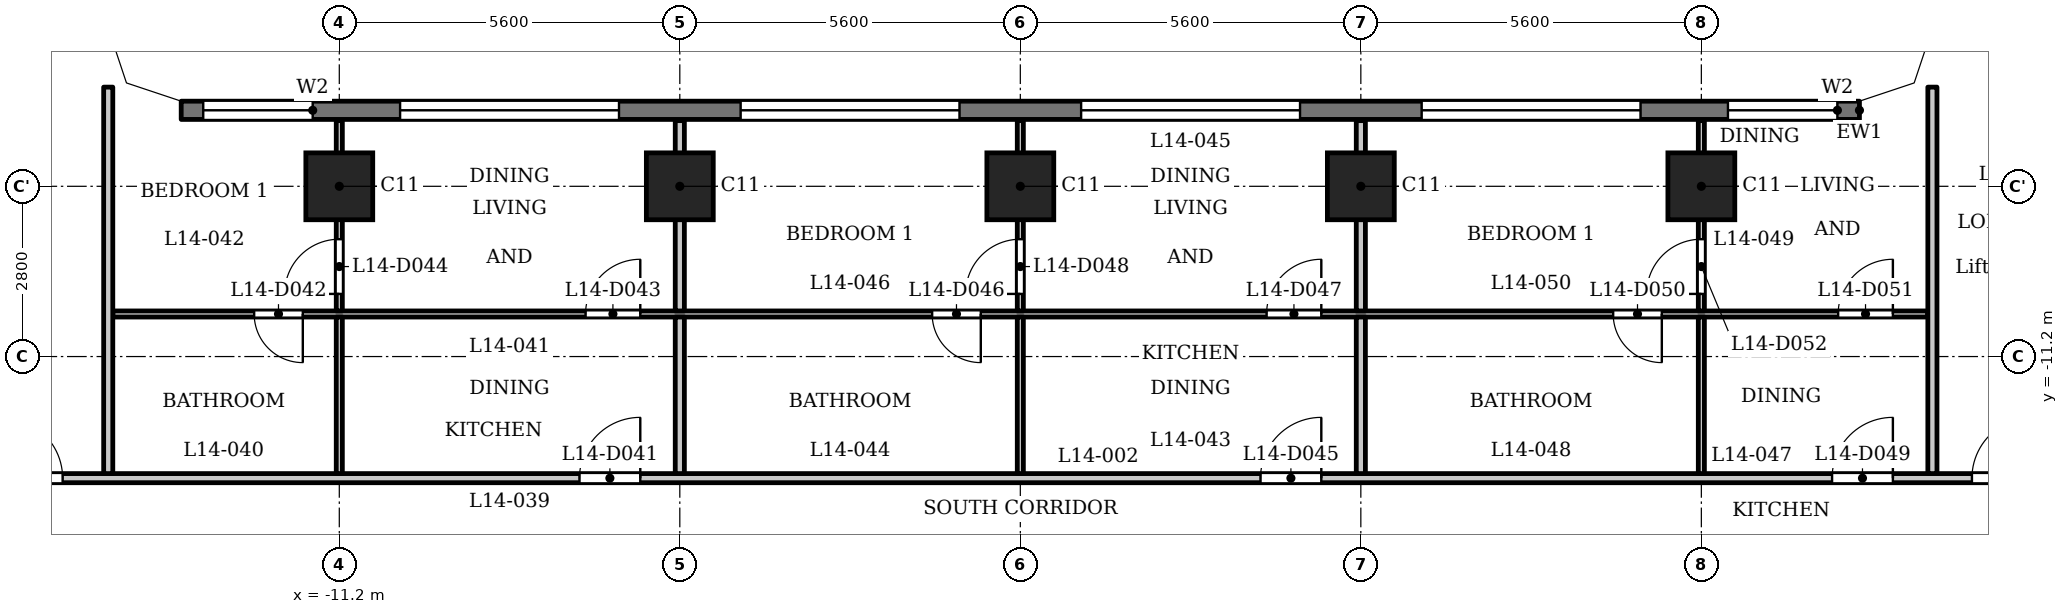
"""IFC4 building model, lengths in metres.
Left out: names, types, materials, properties, quantities, classifications, styles, units other than length and angle.
Written with IfcOpenShell. Run it as: python <this file> out.ifc"""

import sys

from ifc_helpers import new_model, si_unit, direction, frame, frame_2d, origin, origin_2d, place, context, subcontext, project, spatial, polyline, rectangle, outline, extrude, element, fill, save


model = new_model("IFC4")
c1 = context("Model", 3, precision=1e-05, world=origin(), true_north=direction((0.0, 1.0)))
c2 = subcontext(c1, "Body", "Model", "MODEL_VIEW")
j1 = project(units=[si_unit("LENGTHUNIT", "METRE"), si_unit("PLANEANGLEUNIT", "RADIAN")], contexts=[c1])
p1 = place(None, origin())
s1 = spatial("IfcSite", under=j1, at=p1, CompositionType="ELEMENT")
p2 = place(p1, origin())
s2 = spatial("IfcBuilding", under=s1, at=p2, CompositionType="ELEMENT")
p3 = place(p2, frame((0.0, 0.0, 58.5)))
s3 = spatial("IfcBuildingStorey", under=s2, at=p3, CompositionType="ELEMENT", Elevation=58.5)
for number, where, z_axis, x_axis in (
    (1, (-11.2, -8.4, 0.0), (0.0, 0.0, 1.0), (1.0, 0.0, 0.0)),
    (2, (-5.6, -8.4, 0.0), (0.0, 0.0, 1.0), (1.0, 0.0, 0.0)),
    (3, (0.0, -8.4, 0.0), (0.0, 0.0, 1.0), (1.0, 0.0, 0.0)),
    (4, (5.6, -8.4, 0.0), (0.0, 0.0, 1.0), (1.0, 0.0, 0.0)),
    (5, (11.2, -8.4, 0.0), (0.0, 0.0, 1.0), (1.0, 0.0, 0.0)),
):
    element("IfcColumn", number, at=place(p3, frame(where, z_axis=z_axis, x_axis=x_axis)), inside=s3, PredefinedType="COLUMN", context=c2, shape_type="SweptSolid", body=[
        extrude(rectangle(XDim=1.1, YDim=1.1, at=origin_2d()), origin(), (0.0, 0.0, 1.0), 3.5),
    ])
p4 = place(p3, frame((13.8, -7.15, 0.0), z_axis=(0.0, 0.0, 1.0), x_axis=(-1.0, 0.0, 0.0)))
e6 = element("IfcWall", 6, at=p4, inside=s3, PredefinedType="SOLIDWALL", context=c2, shape_type="SweptSolid", body=[
    extrude(rectangle(XDim=27.6, YDim=0.3, at=frame_2d((13.8, 0.0))), origin(), (0.0, 0.0, 1.0), 3.2),
])
p5 = place(p4, frame((0.363, 0.0, 0.9)))
e7 = element("IfcOpeningElement", 7, at=p5, cuts=e6, PredefinedType="OPENING", context=c2, shape_type="SweptSolid", body=[
    extrude(rectangle(XDim=1.8, YDim=1.25, at=frame_2d((0.9, 0.625))), frame((0.0, 0.16, 0.0), z_axis=(0.0, -1.0, 0.0), x_axis=(1.0, 0.0, 0.0)), (0.0, 0.0, 1.0), 0.32),
])
p6 = place(p4, frame((3.6, 0.0, 1.2)))
e8 = element("IfcOpeningElement", 8, at=p6, cuts=e6, PredefinedType="OPENING", context=c2, shape_type="SweptSolid", body=[
    extrude(rectangle(XDim=3.6, YDim=0.95, at=frame_2d((1.8, 0.475))), frame((0.0, 0.16, 0.0), z_axis=(0.0, -1.0, 0.0), x_axis=(1.0, 0.0, 0.0)), (0.0, 0.0, 1.0), 0.32),
])
p7 = place(p4, frame((9.2, 0.0, 1.2)))
e9 = element("IfcOpeningElement", 9, at=p7, cuts=e6, PredefinedType="OPENING", context=c2, shape_type="SweptSolid", body=[
    extrude(rectangle(XDim=3.6, YDim=0.95, at=frame_2d((1.8, 0.475))), frame((0.0, 0.16, 0.0), z_axis=(0.0, -1.0, 0.0), x_axis=(1.0, 0.0, 0.0)), (0.0, 0.0, 1.0), 0.32),
])
p8 = place(p4, frame((14.8, 0.0, 1.2)))
e10 = element("IfcOpeningElement", 10, at=p8, cuts=e6, PredefinedType="OPENING", context=c2, shape_type="SweptSolid", body=[
    extrude(rectangle(XDim=3.6, YDim=0.95, at=frame_2d((1.8, 0.475))), frame((0.0, 0.16, 0.0), z_axis=(0.0, -1.0, 0.0), x_axis=(1.0, 0.0, 0.0)), (0.0, 0.0, 1.0), 0.32),
])
p9 = place(p4, frame((20.4, 0.0, 1.2)))
e11 = element("IfcOpeningElement", 11, at=p9, cuts=e6, PredefinedType="OPENING", context=c2, shape_type="SweptSolid", body=[
    extrude(rectangle(XDim=3.6, YDim=0.95, at=frame_2d((1.8, 0.475))), frame((0.0, 0.16, 0.0), z_axis=(0.0, -1.0, 0.0), x_axis=(1.0, 0.0, 0.0)), (0.0, 0.0, 1.0), 0.32),
])
p10 = place(p4, frame((25.438, 0.0, 0.9)))
e12 = element("IfcOpeningElement", 12, at=p10, cuts=e6, PredefinedType="OPENING", context=c2, shape_type="SweptSolid", body=[
    extrude(rectangle(XDim=1.8, YDim=1.25, at=frame_2d((0.9, 0.625))), frame((0.0, 0.16, 0.0), z_axis=(0.0, -1.0, 0.0), x_axis=(1.0, 0.0, 0.0)), (0.0, 0.0, 1.0), 0.32),
])
p11 = place(p3, frame((-17.4, -13.2, 0.0), z_axis=(0.0, 0.0, 1.0), x_axis=(1.0, 0.0, 0.0)))
e13 = element("IfcWall", 13, at=p11, inside=s3, PredefinedType="PARTITIONING", context=c2, shape_type="SweptSolid", body=[
    extrude(rectangle(XDim=34.8, YDim=0.15, at=frame_2d((17.4, 0.0))), origin(), (0.0, 0.0, 1.0), 3.2),
])
p12 = place(p11, frame((0.65, 0.0, 0.0)))
e14 = element("IfcOpeningElement", 14, at=p12, cuts=e13, PredefinedType="OPENING", context=c2, shape_type="SweptSolid", body=[
    extrude(rectangle(XDim=1.0, YDim=2.1, at=frame_2d((0.5, 1.05))), frame((0.0, 0.085, 0.0), z_axis=(0.0, -1.0, 0.0), x_axis=(1.0, 0.0, 0.0)), (0.0, 0.0, 1.0), 0.17),
])
p13 = place(p11, frame((33.05, 0.0, 0.0)))
e15 = element("IfcOpeningElement", 15, at=p13, cuts=e13, PredefinedType="OPENING", context=c2, shape_type="SweptSolid", body=[
    extrude(rectangle(XDim=1.0, YDim=2.1, at=frame_2d((0.5, 1.05))), frame((0.0, 0.085, 0.0), z_axis=(0.0, -1.0, 0.0), x_axis=(1.0, 0.0, 0.0)), (0.0, 0.0, 1.0), 0.17),
])
p14 = place(p11, frame((10.15, 0.0, 0.0)))
e16 = element("IfcOpeningElement", 16, at=p14, cuts=e13, PredefinedType="OPENING", context=c2, shape_type="SweptSolid", body=[
    extrude(rectangle(XDim=1.0, YDim=2.1, at=frame_2d((0.5, 1.05))), frame((0.0, 0.085, 0.0), z_axis=(0.0, -1.0, 0.0), x_axis=(1.0, 0.0, 0.0)), (0.0, 0.0, 1.0), 0.17),
])
p15 = place(p11, frame((21.35, 0.0, 0.0)))
e17 = element("IfcOpeningElement", 17, at=p15, cuts=e13, PredefinedType="OPENING", context=c2, shape_type="SweptSolid", body=[
    extrude(rectangle(XDim=1.0, YDim=2.1, at=frame_2d((0.5, 1.05))), frame((0.0, 0.085, 0.0), z_axis=(0.0, -1.0, 0.0), x_axis=(1.0, 0.0, 0.0)), (0.0, 0.0, 1.0), 0.17),
])
p16 = place(p11, frame((30.75, 0.0, 0.0)))
e18 = element("IfcOpeningElement", 18, at=p16, cuts=e13, PredefinedType="OPENING", context=c2, shape_type="SweptSolid", body=[
    extrude(rectangle(XDim=1.0, YDim=2.1, at=frame_2d((0.5, 1.05))), frame((0.0, 0.085, 0.0), z_axis=(0.0, -1.0, 0.0), x_axis=(1.0, 0.0, 0.0)), (0.0, 0.0, 1.0), 0.17),
])
p17 = place(p3, frame((-14.925, -10.5, 0.0), z_axis=(0.0, 0.0, 1.0), x_axis=(1.0, 0.0, 0.0)))
e19 = element("IfcWall", 19, at=p17, inside=s3, PredefinedType="PARTITIONING", context=c2, shape_type="SweptSolid", body=[
    extrude(rectangle(XDim=29.85, YDim=0.1, at=frame_2d((14.925, 0.0))), origin(), (0.0, 0.0, 1.0), 3.2),
])
p18 = place(p17, frame((2.325, 0.0, 0.0)))
e20 = element("IfcOpeningElement", 20, at=p18, cuts=e19, PredefinedType="OPENING", context=c2, shape_type="SweptSolid", body=[
    extrude(rectangle(XDim=0.8, YDim=2.1, at=frame_2d((0.4, 1.05))), frame((0.0, 0.06, 0.0), z_axis=(0.0, -1.0, 0.0), x_axis=(1.0, 0.0, 0.0)), (0.0, 0.0, 1.0), 0.12),
])
p19 = place(p17, frame((7.775, 0.0, 0.0)))
e21 = element("IfcOpeningElement", 21, at=p19, cuts=e19, PredefinedType="OPENING", context=c2, shape_type="SweptSolid", body=[
    extrude(rectangle(XDim=0.9, YDim=2.1, at=frame_2d((0.45, 1.05))), frame((0.0, 0.06, 0.0), z_axis=(0.0, -1.0, 0.0), x_axis=(1.0, 0.0, 0.0)), (0.0, 0.0, 1.0), 0.12),
])
p20 = place(p17, frame((13.475, 0.0, 0.0)))
e22 = element("IfcOpeningElement", 22, at=p20, cuts=e19, PredefinedType="OPENING", context=c2, shape_type="SweptSolid", body=[
    extrude(rectangle(XDim=0.8, YDim=2.1, at=frame_2d((0.4, 1.05))), frame((0.0, 0.06, 0.0), z_axis=(0.0, -1.0, 0.0), x_axis=(1.0, 0.0, 0.0)), (0.0, 0.0, 1.0), 0.12),
])
p21 = place(p17, frame((18.975, 0.0, 0.0)))
e23 = element("IfcOpeningElement", 23, at=p21, cuts=e19, PredefinedType="OPENING", context=c2, shape_type="SweptSolid", body=[
    extrude(rectangle(XDim=0.9, YDim=2.1, at=frame_2d((0.45, 1.05))), frame((0.0, 0.06, 0.0), z_axis=(0.0, -1.0, 0.0), x_axis=(1.0, 0.0, 0.0)), (0.0, 0.0, 1.0), 0.12),
])
p22 = place(p17, frame((24.675, 0.0, 0.0)))
e24 = element("IfcOpeningElement", 24, at=p22, cuts=e19, PredefinedType="OPENING", context=c2, shape_type="SweptSolid", body=[
    extrude(rectangle(XDim=0.8, YDim=2.1, at=frame_2d((0.4, 1.05))), frame((0.0, 0.06, 0.0), z_axis=(0.0, -1.0, 0.0), x_axis=(1.0, 0.0, 0.0)), (0.0, 0.0, 1.0), 0.12),
])
p23 = place(p17, frame((28.375, 0.0, 0.0)))
e25 = element("IfcOpeningElement", 25, at=p23, cuts=e19, PredefinedType="OPENING", context=c2, shape_type="SweptSolid", body=[
    extrude(rectangle(XDim=0.9, YDim=2.1, at=frame_2d((0.45, 1.05))), frame((0.0, 0.06, 0.0), z_axis=(0.0, -1.0, 0.0), x_axis=(1.0, 0.0, 0.0)), (0.0, 0.0, 1.0), 0.12),
])
p24 = place(p3, frame((-15.0, -13.125, 0.0), z_axis=(0.0, 0.0, 1.0), x_axis=(0.0, 1.0, 0.0)))
e26 = element("IfcWall", 26, at=p24, inside=s3, PredefinedType="PARTITIONING", context=c2, shape_type="SweptSolid", body=[
    extrude(rectangle(XDim=6.356, YDim=0.15, at=frame_2d((3.178, 0.0))), origin(), (0.0, 0.0, 1.0), 3.2),
])
p25 = place(p3, frame((-11.2, -13.125, 0.0), z_axis=(0.0, 0.0, 1.0), x_axis=(0.0, 1.0, 0.0)))
e27 = element("IfcWall", 27, at=p25, inside=s3, PredefinedType="PARTITIONING", context=c2, shape_type="SweptSolid", body=[
    extrude(rectangle(XDim=2.575, YDim=0.1, at=frame_2d((1.288, 0.0))), origin(), (0.0, 0.0, 1.0), 3.2),
])
p26 = place(p3, frame((-11.2, -10.45, 0.0), z_axis=(0.0, 0.0, 1.0), x_axis=(0.0, 1.0, 0.0)))
e28 = element("IfcWall", 28, at=p26, inside=s3, PredefinedType="PARTITIONING", context=c2, shape_type="SweptSolid", body=[
    extrude(rectangle(XDim=3.13, YDim=0.1, at=frame_2d((1.565, 0.0))), origin(), (0.0, 0.0, 1.0), 3.2),
])
p27 = place(p26, frame((0.28, 0.0, 0.0)))
e29 = element("IfcOpeningElement", 29, at=p27, cuts=e28, PredefinedType="OPENING", context=c2, shape_type="SweptSolid", body=[
    extrude(rectangle(XDim=0.9, YDim=2.1, at=frame_2d((0.45, 1.05))), frame((0.0, 0.06, 0.0), z_axis=(0.0, -1.0, 0.0), x_axis=(1.0, 0.0, 0.0)), (0.0, 0.0, 1.0), 0.12),
])
p28 = place(p3, frame((-5.6, -13.125, 0.0), z_axis=(0.0, 0.0, 1.0), x_axis=(0.0, 1.0, 0.0)))
e30 = element("IfcWall", 30, at=p28, inside=s3, PredefinedType="PARTITIONING", context=c2, shape_type="SweptSolid", body=[
    extrude(rectangle(XDim=2.575, YDim=0.15, at=frame_2d((1.288, 0.0))), origin(), (0.0, 0.0, 1.0), 3.2),
])
p29 = place(p3, frame((-5.6, -10.45, 0.0), z_axis=(0.0, 0.0, 1.0), x_axis=(0.0, 1.0, 0.0)))
e31 = element("IfcWall", 31, at=p29, inside=s3, PredefinedType="PARTITIONING", context=c2, shape_type="SweptSolid", body=[
    extrude(rectangle(XDim=3.13, YDim=0.15, at=frame_2d((1.565, 0.0))), origin(), (0.0, 0.0, 1.0), 3.2),
])
p30 = place(p3, frame((0.0, -13.125, 0.0), z_axis=(0.0, 0.0, 1.0), x_axis=(0.0, 1.0, 0.0)))
e32 = element("IfcWall", 32, at=p30, inside=s3, PredefinedType="PARTITIONING", context=c2, shape_type="SweptSolid", body=[
    extrude(rectangle(XDim=2.575, YDim=0.1, at=frame_2d((1.288, 0.0))), origin(), (0.0, 0.0, 1.0), 3.2),
])
p31 = place(p3, frame((0.0, -10.45, 0.0), z_axis=(0.0, 0.0, 1.0), x_axis=(0.0, 1.0, 0.0)))
e33 = element("IfcWall", 33, at=p31, inside=s3, PredefinedType="PARTITIONING", context=c2, shape_type="SweptSolid", body=[
    extrude(rectangle(XDim=3.13, YDim=0.1, at=frame_2d((1.565, 0.0))), origin(), (0.0, 0.0, 1.0), 3.2),
])
p32 = place(p31, frame((0.28, 0.0, 0.0)))
e34 = element("IfcOpeningElement", 34, at=p32, cuts=e33, PredefinedType="OPENING", context=c2, shape_type="SweptSolid", body=[
    extrude(rectangle(XDim=0.9, YDim=2.1, at=frame_2d((0.45, 1.05))), frame((0.0, 0.06, 0.0), z_axis=(0.0, -1.0, 0.0), x_axis=(1.0, 0.0, 0.0)), (0.0, 0.0, 1.0), 0.12),
])
p33 = place(p3, frame((5.6, -13.125, 0.0), z_axis=(0.0, 0.0, 1.0), x_axis=(0.0, 1.0, 0.0)))
e35 = element("IfcWall", 35, at=p33, inside=s3, PredefinedType="PARTITIONING", context=c2, shape_type="SweptSolid", body=[
    extrude(rectangle(XDim=2.575, YDim=0.15, at=frame_2d((1.288, 0.0))), origin(), (0.0, 0.0, 1.0), 3.2),
])
p34 = place(p3, frame((5.6, -10.45, 0.0), z_axis=(0.0, 0.0, 1.0), x_axis=(0.0, 1.0, 0.0)))
e36 = element("IfcWall", 36, at=p34, inside=s3, PredefinedType="PARTITIONING", context=c2, shape_type="SweptSolid", body=[
    extrude(rectangle(XDim=3.13, YDim=0.15, at=frame_2d((1.565, 0.0))), origin(), (0.0, 0.0, 1.0), 3.2),
])
p35 = place(p3, frame((11.2, -13.125, 0.0), z_axis=(0.0, 0.0, 1.0), x_axis=(0.0, 1.0, 0.0)))
e37 = element("IfcWall", 37, at=p35, inside=s3, PredefinedType="PARTITIONING", context=c2, shape_type="SweptSolid", body=[
    extrude(rectangle(XDim=2.575, YDim=0.1, at=frame_2d((1.288, 0.0))), origin(), (0.0, 0.0, 1.0), 3.2),
])
p36 = place(p3, frame((11.2, -10.45, 0.0), z_axis=(0.0, 0.0, 1.0), x_axis=(0.0, 1.0, 0.0)))
e38 = element("IfcWall", 38, at=p36, inside=s3, PredefinedType="PARTITIONING", context=c2, shape_type="SweptSolid", body=[
    extrude(rectangle(XDim=3.13, YDim=0.1, at=frame_2d((1.565, 0.0))), origin(), (0.0, 0.0, 1.0), 3.2),
])
p37 = place(p36, frame((0.28, 0.0, 0.0)))
e39 = element("IfcOpeningElement", 39, at=p37, cuts=e38, PredefinedType="OPENING", context=c2, shape_type="SweptSolid", body=[
    extrude(rectangle(XDim=0.9, YDim=2.1, at=frame_2d((0.45, 1.05))), frame((0.0, 0.06, 0.0), z_axis=(0.0, -1.0, 0.0), x_axis=(1.0, 0.0, 0.0)), (0.0, 0.0, 1.0), 0.12),
])
p38 = place(p3, frame((15.0, -13.125, 0.0), z_axis=(0.0, 0.0, 1.0), x_axis=(0.0, 1.0, 0.0)))
e40 = element("IfcWall", 40, at=p38, inside=s3, PredefinedType="PARTITIONING", context=c2, shape_type="SweptSolid", body=[
    extrude(rectangle(XDim=6.356, YDim=0.15, at=frame_2d((3.178, 0.0))), origin(), (0.0, 0.0, 1.0), 3.2),
])
p39 = place(p3, origin())
e41 = element("IfcWall", 41, at=p39, inside=s3, PredefinedType="SOLIDWALL", context=c2, shape_type="SweptSolid", body=[
    extrude(outline(polyline([(14.937, -6.937), (15.3, -5.849), (15.3, -5.8), (15.0, -5.8), (14.7, -6.7), (13.8, -7.0), (13.8, -7.3), (13.849, -7.3), (14.937, -6.937)])), origin(), (0.0, 0.0, 1.0), 3.2),
])
e42 = element("IfcWall", 42, at=p39, inside=s3, PredefinedType="SOLIDWALL", context=c2, shape_type="SweptSolid", body=[
    extrude(outline(polyline([(-14.937, -6.937), (-13.849, -7.3), (-13.8, -7.3), (-13.8, -7.0), (-14.7, -6.7), (-15.0, -5.8), (-15.3, -5.8), (-15.3, -5.849), (-14.937, -6.937)])), origin(), (0.0, 0.0, 1.0), 3.2),
])
p40 = place(p12, origin())
e43 = element("IfcDoor", 43, at=p40, inside=s3, OperationType="SINGLE_SWING_RIGHT", PredefinedType="DOOR", context=c2, shape_type="SweptSolid", body=[
    extrude(rectangle(XDim=1.0, YDim=2.1, at=frame_2d((0.5, 1.05))), frame((0.0, 0.025, 0.0), z_axis=(0.0, -1.0, 0.0), x_axis=(1.0, 0.0, 0.0)), (0.0, 0.0, 1.0), 0.05),
])
fill(e14, e43)
p41 = place(p13, origin())
e44 = element("IfcDoor", 44, at=p41, inside=s3, OperationType="SINGLE_SWING_LEFT", PredefinedType="DOOR", context=c2, shape_type="SweptSolid", body=[
    extrude(rectangle(XDim=1.0, YDim=2.1, at=frame_2d((0.5, 1.05))), frame((0.0, 0.025, 0.0), z_axis=(0.0, -1.0, 0.0), x_axis=(1.0, 0.0, 0.0)), (0.0, 0.0, 1.0), 0.05),
])
fill(e15, e44)
p42 = place(p14, origin())
e45 = element("IfcDoor", 45, at=p42, inside=s3, OperationType="SINGLE_SWING_LEFT", PredefinedType="DOOR", context=c2, shape_type="SweptSolid", body=[
    extrude(rectangle(XDim=1.0, YDim=2.1, at=frame_2d((0.5, 1.05))), frame((0.0, 0.025, 0.0), z_axis=(0.0, -1.0, 0.0), x_axis=(1.0, 0.0, 0.0)), (0.0, 0.0, 1.0), 0.05),
])
fill(e16, e45)
p43 = place(p18, origin())
e46 = element("IfcDoor", 46, at=p43, inside=s3, OperationType="SINGLE_SWING_RIGHT", PredefinedType="DOOR", context=c2, shape_type="SweptSolid", body=[
    extrude(rectangle(XDim=0.8, YDim=2.1, at=frame_2d((0.4, 1.05))), frame((0.0, 0.025, 0.0), z_axis=(0.0, -1.0, 0.0), x_axis=(1.0, 0.0, 0.0)), (0.0, 0.0, 1.0), 0.05),
])
fill(e20, e46)
p44 = place(p19, origin())
e47 = element("IfcDoor", 47, at=p44, inside=s3, OperationType="SINGLE_SWING_LEFT", PredefinedType="DOOR", context=c2, shape_type="SweptSolid", body=[
    extrude(rectangle(XDim=0.9, YDim=2.1, at=frame_2d((0.45, 1.05))), frame((0.0, 0.025, 0.0), z_axis=(0.0, -1.0, 0.0), x_axis=(1.0, 0.0, 0.0)), (0.0, 0.0, 1.0), 0.05),
])
fill(e21, e47)
p45 = place(p27, origin())
e48 = element("IfcDoor", 48, at=p45, inside=s3, OperationType="SINGLE_SWING_RIGHT", PredefinedType="DOOR", context=c2, shape_type="SweptSolid", body=[
    extrude(rectangle(XDim=0.9, YDim=2.1, at=frame_2d((0.45, 1.05))), frame((0.0, 0.025, 0.0), z_axis=(0.0, -1.0, 0.0), x_axis=(1.0, 0.0, 0.0)), (0.0, 0.0, 1.0), 0.05),
])
fill(e29, e48)
p46 = place(p15, origin())
e49 = element("IfcDoor", 49, at=p46, inside=s3, OperationType="SINGLE_SWING_LEFT", PredefinedType="DOOR", context=c2, shape_type="SweptSolid", body=[
    extrude(rectangle(XDim=1.0, YDim=2.1, at=frame_2d((0.5, 1.05))), frame((0.0, 0.025, 0.0), z_axis=(0.0, -1.0, 0.0), x_axis=(1.0, 0.0, 0.0)), (0.0, 0.0, 1.0), 0.05),
])
fill(e17, e49)
p47 = place(p20, origin())
e50 = element("IfcDoor", 50, at=p47, inside=s3, OperationType="SINGLE_SWING_RIGHT", PredefinedType="DOOR", context=c2, shape_type="SweptSolid", body=[
    extrude(rectangle(XDim=0.8, YDim=2.1, at=frame_2d((0.4, 1.05))), frame((0.0, 0.025, 0.0), z_axis=(0.0, -1.0, 0.0), x_axis=(1.0, 0.0, 0.0)), (0.0, 0.0, 1.0), 0.05),
])
fill(e22, e50)
p48 = place(p21, origin())
e51 = element("IfcDoor", 51, at=p48, inside=s3, OperationType="SINGLE_SWING_LEFT", PredefinedType="DOOR", context=c2, shape_type="SweptSolid", body=[
    extrude(rectangle(XDim=0.9, YDim=2.1, at=frame_2d((0.45, 1.05))), frame((0.0, 0.025, 0.0), z_axis=(0.0, -1.0, 0.0), x_axis=(1.0, 0.0, 0.0)), (0.0, 0.0, 1.0), 0.05),
])
fill(e23, e51)
p49 = place(p32, origin())
e52 = element("IfcDoor", 52, at=p49, inside=s3, OperationType="SINGLE_SWING_RIGHT", PredefinedType="DOOR", context=c2, shape_type="SweptSolid", body=[
    extrude(rectangle(XDim=0.9, YDim=2.1, at=frame_2d((0.45, 1.05))), frame((0.0, 0.025, 0.0), z_axis=(0.0, -1.0, 0.0), x_axis=(1.0, 0.0, 0.0)), (0.0, 0.0, 1.0), 0.05),
])
fill(e34, e52)
p50 = place(p16, origin())
e53 = element("IfcDoor", 53, at=p50, inside=s3, OperationType="SINGLE_SWING_LEFT", PredefinedType="DOOR", context=c2, shape_type="SweptSolid", body=[
    extrude(rectangle(XDim=1.0, YDim=2.1, at=frame_2d((0.5, 1.05))), frame((0.0, 0.025, 0.0), z_axis=(0.0, -1.0, 0.0), x_axis=(1.0, 0.0, 0.0)), (0.0, 0.0, 1.0), 0.05),
])
fill(e18, e53)
p51 = place(p22, origin())
e54 = element("IfcDoor", 54, at=p51, inside=s3, OperationType="SINGLE_SWING_RIGHT", PredefinedType="DOOR", context=c2, shape_type="SweptSolid", body=[
    extrude(rectangle(XDim=0.8, YDim=2.1, at=frame_2d((0.4, 1.05))), frame((0.0, 0.025, 0.0), z_axis=(0.0, -1.0, 0.0), x_axis=(1.0, 0.0, 0.0)), (0.0, 0.0, 1.0), 0.05),
])
fill(e24, e54)
p52 = place(p23, origin())
e55 = element("IfcDoor", 55, at=p52, inside=s3, OperationType="SINGLE_SWING_LEFT", PredefinedType="DOOR", context=c2, shape_type="SweptSolid", body=[
    extrude(rectangle(XDim=0.9, YDim=2.1, at=frame_2d((0.45, 1.05))), frame((0.0, 0.025, 0.0), z_axis=(0.0, -1.0, 0.0), x_axis=(1.0, 0.0, 0.0)), (0.0, 0.0, 1.0), 0.05),
])
fill(e25, e55)
p53 = place(p37, origin())
e56 = element("IfcDoor", 56, at=p53, inside=s3, OperationType="SINGLE_SWING_RIGHT", PredefinedType="DOOR", context=c2, shape_type="SweptSolid", body=[
    extrude(rectangle(XDim=0.9, YDim=2.1, at=frame_2d((0.45, 1.05))), frame((0.0, 0.025, 0.0), z_axis=(0.0, -1.0, 0.0), x_axis=(1.0, 0.0, 0.0)), (0.0, 0.0, 1.0), 0.05),
])
fill(e39, e56)
p54 = place(p5, origin())
e57 = element("IfcWindow", 57, at=p54, inside=s3, PartitioningType="SINGLE_PANEL", PredefinedType="WINDOW", context=c2, shape_type="SweptSolid", body=[
    extrude(rectangle(XDim=1.8, YDim=1.25, at=frame_2d((0.9, 0.625))), frame((0.0, 0.03, 0.0), z_axis=(0.0, -1.0, 0.0), x_axis=(1.0, 0.0, 0.0)), (0.0, 0.0, 1.0), 0.06),
])
fill(e7, e57)
p55 = place(p6, origin())
e58 = element("IfcWindow", 58, at=p55, inside=s3, PartitioningType="SINGLE_PANEL", PredefinedType="WINDOW", context=c2, shape_type="SweptSolid", body=[
    extrude(rectangle(XDim=3.6, YDim=0.95, at=frame_2d((1.8, 0.475))), frame((0.0, 0.03, 0.0), z_axis=(0.0, -1.0, 0.0), x_axis=(1.0, 0.0, 0.0)), (0.0, 0.0, 1.0), 0.06),
])
fill(e8, e58)
p56 = place(p7, origin())
e59 = element("IfcWindow", 59, at=p56, inside=s3, PartitioningType="SINGLE_PANEL", PredefinedType="WINDOW", context=c2, shape_type="SweptSolid", body=[
    extrude(rectangle(XDim=3.6, YDim=0.95, at=frame_2d((1.8, 0.475))), frame((0.0, 0.03, 0.0), z_axis=(0.0, -1.0, 0.0), x_axis=(1.0, 0.0, 0.0)), (0.0, 0.0, 1.0), 0.06),
])
fill(e9, e59)
p57 = place(p8, origin())
e60 = element("IfcWindow", 60, at=p57, inside=s3, PartitioningType="SINGLE_PANEL", PredefinedType="WINDOW", context=c2, shape_type="SweptSolid", body=[
    extrude(rectangle(XDim=3.6, YDim=0.95, at=frame_2d((1.8, 0.475))), frame((0.0, 0.03, 0.0), z_axis=(0.0, -1.0, 0.0), x_axis=(1.0, 0.0, 0.0)), (0.0, 0.0, 1.0), 0.06),
])
fill(e10, e60)
p58 = place(p9, origin())
e61 = element("IfcWindow", 61, at=p58, inside=s3, PartitioningType="SINGLE_PANEL", PredefinedType="WINDOW", context=c2, shape_type="SweptSolid", body=[
    extrude(rectangle(XDim=3.6, YDim=0.95, at=frame_2d((1.8, 0.475))), frame((0.0, 0.03, 0.0), z_axis=(0.0, -1.0, 0.0), x_axis=(1.0, 0.0, 0.0)), (0.0, 0.0, 1.0), 0.06),
])
fill(e11, e61)
p59 = place(p10, origin())
e62 = element("IfcWindow", 62, at=p59, inside=s3, PartitioningType="SINGLE_PANEL", PredefinedType="WINDOW", context=c2, shape_type="SweptSolid", body=[
    extrude(rectangle(XDim=1.8, YDim=1.25, at=frame_2d((0.9, 0.625))), frame((0.0, 0.03, 0.0), z_axis=(0.0, -1.0, 0.0), x_axis=(1.0, 0.0, 0.0)), (0.0, 0.0, 1.0), 0.06),
])
fill(e12, e62)
save(model, sys.argv[1])
